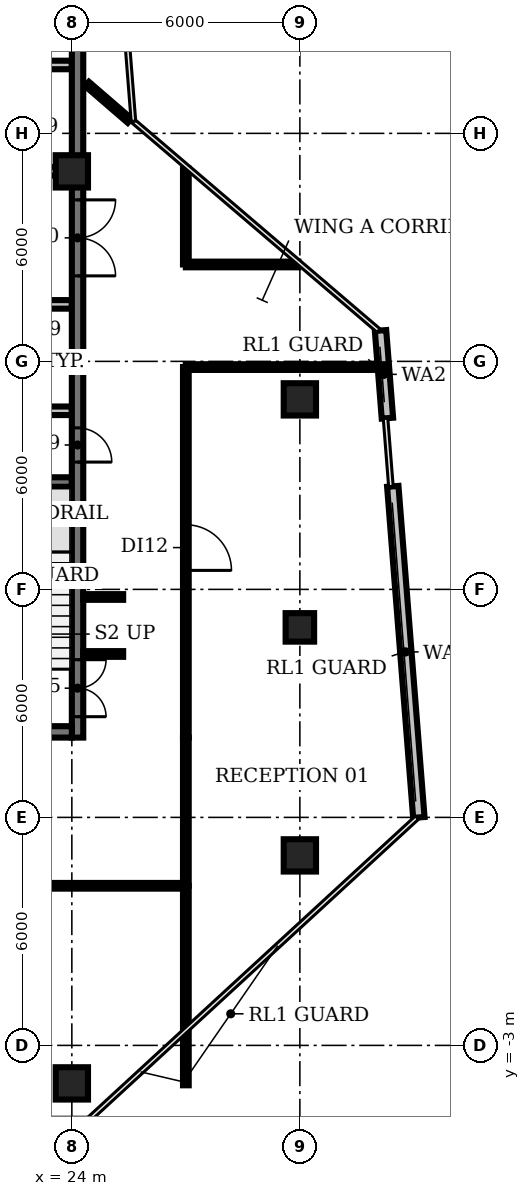
"""IFC4 building model, lengths in metres.
Left out: names, types, materials, properties, quantities, classifications, styles, units other than length and angle.
Written with IfcOpenShell. Run it as: python <this file> out.ifc"""

import sys

from ifc_helpers import new_model, si_unit, direction, frame, frame_2d, origin, origin_2d, place, context, subcontext, project, spatial, rectangle, circle, extrude, element, fill, save


model = new_model("IFC4")
c1 = context("Model", 3, precision=1e-05, world=origin(), true_north=direction((0.0, 1.0)))
c2 = subcontext(c1, "Body", "Model", "MODEL_VIEW")
j1 = project(units=[si_unit("LENGTHUNIT", "METRE"), si_unit("PLANEANGLEUNIT", "RADIAN")], contexts=[c1])
p1 = place(None, origin())
s1 = spatial("IfcSite", under=j1, at=p1, CompositionType="ELEMENT")
p2 = place(p1, origin())
s2 = spatial("IfcBuilding", under=s1, at=p2, CompositionType="ELEMENT")
p3 = place(p2, frame((0.0, 0.0, 306.2)))
s3 = spatial("IfcBuildingStorey", under=s2, at=p3, CompositionType="ELEMENT", Elevation=306.2)
for number, where, z_axis, x_axis in (
    (1, (24.0, -4.0, 0.0), (0.0, 0.0, 1.0), (1.0, 0.0, 0.0)),
    (2, (24.0, 20.0, 0.0), (0.0, 0.0, 1.0), (1.0, 0.0, 0.0)),
    (3, (30.0, 2.0, 0.0), (0.0, 0.0, 1.0), (1.0, 0.0, 0.0)),
):
    element("IfcColumn", number, at=place(p3, frame(where, z_axis=z_axis, x_axis=x_axis)), inside=s3, PredefinedType="COLUMN", context=c2, shape_type="SweptSolid", body=[
        extrude(circle(Radius=0.425, at=origin_2d()), origin(), (0.0, 0.0, 1.0), 3.85),
    ])
p4 = place(p3, frame((30.0, 8.0, 0.0), z_axis=(0.0, 0.0, 1.0), x_axis=(1.0, 0.0, 0.0)))
e4 = element("IfcColumn", 4, at=p4, inside=s3, PredefinedType="COLUMN", context=c2, shape_type="SweptSolid", body=[
    extrude(rectangle(XDim=0.75, YDim=0.75, at=origin_2d()), origin(), (0.0, 0.0, 1.0), 3.85),
])
p5 = place(p3, frame((30.0, 14.0, 0.0), z_axis=(0.0, 0.0, 1.0), x_axis=(1.0, 0.0, 0.0)))
e5 = element("IfcColumn", 5, at=p5, inside=s3, PredefinedType="COLUMN", context=c2, shape_type="SweptSolid", body=[
    extrude(circle(Radius=0.425, at=origin_2d()), origin(), (0.0, 0.0, 1.0), 3.85),
])
p6 = place(p3, frame((33.131, 2.998, 0.0), z_axis=(0.0, 0.0, 1.0), x_axis=(-0.078467243586, 0.996916692449, 0.0)))
e6 = element("IfcWall", 6, at=p6, inside=s3, PredefinedType="SOLIDWALL", context=c2, shape_type="SweptSolid", body=[
    extrude(rectangle(XDim=8.74, YDim=0.3, at=frame_2d((4.37, 0.0))), origin(), (0.0, 0.0, 1.0), 3.85),
])
p7 = place(p3, frame((32.304, 13.506, 0.0), z_axis=(0.0, 0.0, 1.0), x_axis=(-0.078407178347, 0.996921418359, 0.0)))
e7 = element("IfcWall", 7, at=p7, inside=s3, PredefinedType="SOLIDWALL", context=c2, shape_type="SweptSolid", body=[
    extrude(rectangle(XDim=2.313, YDim=0.3, at=frame_2d((1.157, 0.0))), origin(), (0.0, 0.0, 1.0), 3.85),
])
p8 = place(p3, frame((20.85, 11.825, 0.0), z_axis=(0.0, 0.0, 1.0), x_axis=(1.0, 0.0, 0.0)))
e8 = element("IfcWall", 8, at=p8, inside=s3, PredefinedType="SHEAR", context=c2, shape_type="SweptSolid", body=[
    extrude(rectangle(XDim=3.15, YDim=0.25, at=frame_2d((1.575, 0.0))), origin(), (0.0, 0.0, 1.0), 3.85),
])
p9 = place(p3, frame((16.6, 13.7, 0.0), z_axis=(0.0, 0.0, 1.0), x_axis=(1.0, 0.0, 0.0)))
e9 = element("IfcWall", 9, at=p9, inside=s3, PredefinedType="PARTITIONING", context=c2, shape_type="SweptSolid", body=[
    extrude(rectangle(XDim=7.4, YDim=0.225, at=frame_2d((3.7, 0.0))), origin(), (0.0, 0.0, 1.0), 3.85),
])
p10 = place(p3, frame((9.4, 16.5, 0.0), z_axis=(0.0, 0.0, 1.0), x_axis=(1.0, 0.0, 0.0)))
e10 = element("IfcWall", 10, at=p10, inside=s3, PredefinedType="PARTITIONING", context=c2, shape_type="SweptSolid", body=[
    extrude(rectangle(XDim=14.6, YDim=0.225, at=frame_2d((7.3, 0.0))), origin(), (0.0, 0.0, 1.0), 3.85),
])
p11 = place(p10, frame((0.85, 0.0, 0.0)))
e11 = element("IfcOpeningElement", 11, at=p11, cuts=e10, PredefinedType="OPENING", context=c2, shape_type="SweptSolid", body=[
    extrude(rectangle(XDim=0.9, YDim=2.1, at=frame_2d((0.45, 1.05))), frame((0.0, 0.123, 0.0), z_axis=(0.0, -1.0, 0.0), x_axis=(1.0, 0.0, 0.0)), (0.0, 0.0, 1.0), 0.245),
])
p12 = place(p10, frame((3.625, 0.0, 0.0)))
e12 = element("IfcOpeningElement", 12, at=p12, cuts=e10, PredefinedType="OPENING", context=c2, shape_type="SweptSolid", body=[
    extrude(rectangle(XDim=0.9, YDim=2.1, at=frame_2d((0.45, 1.05))), frame((0.0, 0.123, 0.0), z_axis=(0.0, -1.0, 0.0), x_axis=(1.0, 0.0, 0.0)), (0.0, 0.0, 1.0), 0.245),
])
p13 = place(p10, frame((7.775, 0.0, 0.0)))
e13 = element("IfcOpeningElement", 13, at=p13, cuts=e10, PredefinedType="OPENING", context=c2, shape_type="SweptSolid", body=[
    extrude(rectangle(XDim=1.0, YDim=2.1, at=frame_2d((0.5, 1.05))), frame((0.0, 0.123, 0.0), z_axis=(0.0, -1.0, 0.0), x_axis=(1.0, 0.0, 0.0)), (0.0, 0.0, 1.0), 0.245),
])
p14 = place(p10, frame((11.308, 0.0, 0.0)))
e14 = element("IfcOpeningElement", 14, at=p14, cuts=e10, PredefinedType="OPENING", context=c2, shape_type="SweptSolid", body=[
    extrude(rectangle(XDim=0.9, YDim=2.1, at=frame_2d((0.45, 1.05))), frame((0.0, 0.123, 0.0), z_axis=(0.0, -1.0, 0.0), x_axis=(1.0, 0.0, 0.0)), (0.0, 0.0, 1.0), 0.245),
])
p15 = place(p10, frame((13.083, 0.0, 0.0)))
e15 = element("IfcOpeningElement", 15, at=p15, cuts=e10, PredefinedType="OPENING", context=c2, shape_type="SweptSolid", body=[
    extrude(rectangle(XDim=0.9, YDim=2.1, at=frame_2d((0.45, 1.05))), frame((0.0, 0.123, 0.0), z_axis=(0.0, -1.0, 0.0), x_axis=(1.0, 0.0, 0.0)), (0.0, 0.0, 1.0), 0.245),
])
p16 = place(p3, frame((24.0, 20.0, 0.0), z_axis=(0.0, 0.0, 1.0), x_axis=(-1.0, 0.0, 0.0)))
e16 = element("IfcWall", 16, at=p16, inside=s3, PredefinedType="PARTITIONING", context=c2, shape_type="SweptSolid", body=[
    extrude(rectangle(XDim=14.6, YDim=0.225, at=frame_2d((7.3, 0.0))), origin(), (0.0, 0.0, 1.0), 3.85),
])
p17 = place(p16, frame((12.75, 0.0, 0.0)))
e17 = element("IfcOpeningElement", 17, at=p17, cuts=e16, PredefinedType="OPENING", context=c2, shape_type="SweptSolid", body=[
    extrude(rectangle(XDim=1.1, YDim=2.1, at=frame_2d((0.55, 1.05))), frame((0.0, 0.123, 0.0), z_axis=(0.0, -1.0, 0.0), x_axis=(1.0, 0.0, 0.0)), (0.0, 0.0, 1.0), 0.245),
])
p18 = place(p16, frame((9.95, 0.0, 0.0)))
e18 = element("IfcOpeningElement", 18, at=p18, cuts=e16, PredefinedType="OPENING", context=c2, shape_type="SweptSolid", body=[
    extrude(rectangle(XDim=1.1, YDim=2.1, at=frame_2d((0.55, 1.05))), frame((0.0, 0.123, 0.0), z_axis=(0.0, -1.0, 0.0), x_axis=(1.0, 0.0, 0.0)), (0.0, 0.0, 1.0), 0.245),
])
p19 = place(p16, frame((7.15, 0.0, 0.0)))
e19 = element("IfcOpeningElement", 19, at=p19, cuts=e16, PredefinedType="OPENING", context=c2, shape_type="SweptSolid", body=[
    extrude(rectangle(XDim=1.1, YDim=2.1, at=frame_2d((0.55, 1.05))), frame((0.0, 0.123, 0.0), z_axis=(0.0, -1.0, 0.0), x_axis=(1.0, 0.0, 0.0)), (0.0, 0.0, 1.0), 0.245),
])
p20 = place(p16, frame((4.35, 0.0, 0.0)))
e20 = element("IfcOpeningElement", 20, at=p20, cuts=e16, PredefinedType="OPENING", context=c2, shape_type="SweptSolid", body=[
    extrude(rectangle(XDim=1.1, YDim=2.1, at=frame_2d((0.55, 1.05))), frame((0.0, 0.123, 0.0), z_axis=(0.0, -1.0, 0.0), x_axis=(1.0, 0.0, 0.0)), (0.0, 0.0, 1.0), 0.245),
])
p21 = place(p16, frame((2.308, 0.0, 0.0)))
e21 = element("IfcOpeningElement", 21, at=p21, cuts=e16, PredefinedType="OPENING", context=c2, shape_type="SweptSolid", body=[
    extrude(rectangle(XDim=0.9, YDim=2.1, at=frame_2d((0.45, 1.05))), frame((0.0, 0.123, 0.0), z_axis=(0.0, -1.0, 0.0), x_axis=(1.0, 0.0, 0.0)), (0.0, 0.0, 1.0), 0.245),
])
p22 = place(p16, frame((0.633, 0.0, 0.0)))
e22 = element("IfcOpeningElement", 22, at=p22, cuts=e16, PredefinedType="OPENING", context=c2, shape_type="SweptSolid", body=[
    extrude(rectangle(XDim=0.9, YDim=2.1, at=frame_2d((0.45, 1.05))), frame((0.0, 0.123, 0.0), z_axis=(0.0, -1.0, 0.0), x_axis=(1.0, 0.0, 0.0)), (0.0, 0.0, 1.0), 0.245),
])
p23 = place(p3, frame((9.4, 22.8, 0.0), z_axis=(0.0, 0.0, 1.0), x_axis=(1.0, 0.0, 0.0)))
e23 = element("IfcWall", 23, at=p23, inside=s3, PredefinedType="PARTITIONING", context=c2, shape_type="SweptSolid", body=[
    extrude(rectangle(XDim=14.6, YDim=0.225, at=frame_2d((7.3, 0.0))), origin(), (0.0, 0.0, 1.0), 3.85),
])
p24 = place(p3, frame((24.15, 25.655, 0.0), z_axis=(0.0, 0.0, 1.0), x_axis=(0.0, -1.0, 0.0)))
e24 = element("IfcWall", 24, at=p24, inside=s3, PredefinedType="SHEAR", context=c2, shape_type="SweptSolid", body=[
    extrude(rectangle(XDim=20.555, YDim=0.3, at=frame_2d((10.277, 0.0))), origin(), (0.0, 0.0, 1.0), 3.85),
])
p25 = place(p24, frame((18.505, 0.0, 0.0)))
e25 = element("IfcOpeningElement", 25, at=p25, cuts=e24, PredefinedType="OPENING", context=c2, shape_type="SweptSolid", body=[
    extrude(rectangle(XDim=1.5, YDim=2.1, at=frame_2d((0.75, 1.05))), frame((0.0, 0.16, 0.0), z_axis=(0.0, -1.0, 0.0), x_axis=(1.0, 0.0, 0.0)), (0.0, 0.0, 1.0), 0.32),
])
p26 = place(p24, frame((12.405, 0.0, 0.0)))
e26 = element("IfcOpeningElement", 26, at=p26, cuts=e24, PredefinedType="OPENING", context=c2, shape_type="SweptSolid", body=[
    extrude(rectangle(XDim=0.9, YDim=2.1, at=frame_2d((0.45, 1.05))), frame((0.0, 0.16, 0.0), z_axis=(0.0, -1.0, 0.0), x_axis=(1.0, 0.0, 0.0)), (0.0, 0.0, 1.0), 0.32),
])
p27 = place(p24, frame((6.405, 0.0, 0.0)))
e27 = element("IfcOpeningElement", 27, at=p27, cuts=e24, PredefinedType="OPENING", context=c2, shape_type="SweptSolid", body=[
    extrude(rectangle(XDim=2.0, YDim=2.1, at=frame_2d((1.0, 1.05))), frame((0.0, 0.16, 0.0), z_axis=(0.0, -1.0, 0.0), x_axis=(1.0, 0.0, 0.0)), (0.0, 0.0, 1.0), 0.32),
])
p28 = place(p3, frame((24.0, 5.25, 0.0), z_axis=(0.0, 0.0, 1.0), x_axis=(-1.0, 0.0, 0.0)))
e28 = element("IfcWall", 28, at=p28, inside=s3, PredefinedType="SHEAR", context=c2, shape_type="SweptSolid", body=[
    extrude(rectangle(XDim=18.0, YDim=0.3, at=frame_2d((9.0, 0.0))), origin(), (0.0, 0.0, 1.0), 3.85),
])
p29 = place(p28, frame((13.0, 0.0, 0.0)))
e29 = element("IfcOpeningElement", 29, at=p29, cuts=e28, PredefinedType="OPENING", context=c2, shape_type="SweptSolid", body=[
    extrude(rectangle(XDim=1.2, YDim=2.1, at=frame_2d((0.6, 1.05))), frame((0.0, 0.16, 0.0), z_axis=(0.0, -1.0, 0.0), x_axis=(1.0, 0.0, 0.0)), (0.0, 0.0, 1.0), 0.32),
])
p30 = place(p28, frame((4.9, 0.0, 0.0)))
e30 = element("IfcOpeningElement", 30, at=p30, cuts=e28, PredefinedType="OPENING", context=c2, shape_type="SweptSolid", body=[
    extrude(rectangle(XDim=1.0, YDim=2.1, at=frame_2d((0.5, 1.05))), frame((0.0, 0.16, 0.0), z_axis=(0.0, -1.0, 0.0), x_axis=(1.0, 0.0, 0.0)), (0.0, 0.0, 1.0), 0.32),
])
for number, where, z_axis, x_axis in (
    (31, (24.3, 7.3, 0.0), (0.0, 0.0, 1.0), (1.0, 0.0, 0.0)),
    (32, (24.3, 8.8, 0.0), (0.0, 0.0, 1.0), (1.0, 0.0, 0.0)),
):
    element("IfcWall", number, at=place(p3, frame(where, z_axis=z_axis, x_axis=x_axis)), inside=s3, PredefinedType="PARTITIONING", context=c2, shape_type="SweptSolid", body=[
        extrude(rectangle(XDim=1.05, YDim=0.15, at=frame_2d((0.525, 0.0))), origin(), (0.0, 0.0, 1.0), 2.9),
    ])
p31 = place(p3, frame((24.4, 22.3, 0.0), z_axis=(0.0, 0.0, 1.0), x_axis=(0.756967766194, -0.653452217796, 0.0)))
e33 = element("IfcWall", 33, at=p31, inside=s3, PredefinedType="PARTITIONING", context=c2, shape_type="SweptSolid", body=[
    extrude(rectangle(XDim=1.479, YDim=0.15, at=frame_2d((0.739, 0.0))), origin(), (0.0, 0.0, 1.0), 2.9),
])
p32 = place(p3, frame((27.0, -4.05, 0.0), z_axis=(0.0, 0.0, 1.0), x_axis=(0.0, 1.0, 0.0)))
e34 = element("IfcWall", 34, at=p32, inside=s3, PredefinedType="PARTITIONING", context=c2, shape_type="SweptSolid", body=[
    extrude(rectangle(XDim=5.25, YDim=0.15, at=frame_2d((2.625, 0.0))), origin(), (0.0, 0.0, 1.0), 2.9),
])
p33 = place(p3, frame((27.0, 1.2, 0.0), z_axis=(0.0, 0.0, 1.0), x_axis=(-1.0, 0.0, 0.0)))
e35 = element("IfcWall", 35, at=p33, inside=s3, PredefinedType="PARTITIONING", context=c2, shape_type="SweptSolid", body=[
    extrude(rectangle(XDim=24.0, YDim=0.15, at=frame_2d((12.0, 0.0))), origin(), (0.0, 0.0, 1.0), 2.9),
])
p34 = place(p33, frame((11.5, 0.0, 0.0)))
e36 = element("IfcOpeningElement", 36, at=p34, cuts=e35, PredefinedType="OPENING", context=c2, shape_type="SweptSolid", body=[
    extrude(rectangle(XDim=1.2, YDim=2.1, at=frame_2d((0.6, 1.05))), frame((0.0, 0.085, 0.0), z_axis=(0.0, -1.0, 0.0), x_axis=(1.0, 0.0, 0.0)), (0.0, 0.0, 1.0), 0.17),
])
p35 = place(p3, frame((27.0, 1.2, 0.0), z_axis=(0.0, 0.0, 1.0), x_axis=(0.0, 1.0, 0.0)))
e37 = element("IfcWall", 37, at=p35, inside=s3, PredefinedType="PARTITIONING", context=c2, shape_type="SweptSolid", body=[
    extrude(rectangle(XDim=3.9, YDim=0.15, at=frame_2d((1.95, 0.0))), origin(), (0.0, 0.0, 1.0), 2.9),
])
p36 = place(p3, frame((27.0, 14.85, 0.0), z_axis=(0.0, 0.0, 1.0), x_axis=(0.0, -1.0, 0.0)))
e38 = element("IfcWall", 38, at=p36, inside=s3, PredefinedType="PARTITIONING", context=c2, shape_type="SweptSolid", body=[
    extrude(rectangle(XDim=9.75, YDim=0.15, at=frame_2d((4.875, 0.0))), origin(), (0.0, 0.0, 1.0), 2.9),
])
p37 = place(p36, frame((4.15, 0.0, 0.0)))
e39 = element("IfcOpeningElement", 39, at=p37, cuts=e38, PredefinedType="OPENING", context=c2, shape_type="SweptSolid", body=[
    extrude(rectangle(XDim=1.2, YDim=2.1, at=frame_2d((0.6, 1.05))), frame((0.0, 0.085, 0.0), z_axis=(0.0, -1.0, 0.0), x_axis=(1.0, 0.0, 0.0)), (0.0, 0.0, 1.0), 0.17),
])
p38 = place(p3, frame((27.0, 14.85, 0.0), z_axis=(0.0, 0.0, 1.0), x_axis=(1.0, 0.0, 0.0)))
e40 = element("IfcWall", 40, at=p38, inside=s3, PredefinedType="PARTITIONING", context=c2, shape_type="SweptSolid", body=[
    extrude(rectangle(XDim=5.208, YDim=0.15, at=frame_2d((2.604, 0.0))), origin(), (0.0, 0.0, 1.0), 2.9),
])
p39 = place(p3, frame((27.0, 17.55, 0.0), z_axis=(0.0, 0.0, 1.0), x_axis=(0.0, 1.0, 0.0)))
e41 = element("IfcWall", 41, at=p39, inside=s3, PredefinedType="PARTITIONING", context=c2, shape_type="SweptSolid", body=[
    extrude(rectangle(XDim=2.52, YDim=0.15, at=frame_2d((1.26, 0.0))), origin(), (0.0, 0.0, 1.0), 2.9),
])
p40 = place(p3, frame((27.0, 17.55, 0.0), z_axis=(0.0, 0.0, 1.0), x_axis=(1.0, 0.0, 0.0)))
e42 = element("IfcWall", 42, at=p40, inside=s3, PredefinedType="PARTITIONING", context=c2, shape_type="SweptSolid", body=[
    extrude(rectangle(XDim=2.96, YDim=0.15, at=frame_2d((1.48, 0.0))), origin(), (0.0, 0.0, 1.0), 2.9),
])
p41 = place(p25, origin())
e43 = element("IfcDoor", 43, at=p41, inside=s3, OperationType="DOUBLE_DOOR_SINGLE_SWING", PredefinedType="DOOR", context=c2, shape_type="SweptSolid", body=[
    extrude(rectangle(XDim=1.5, YDim=2.1, at=frame_2d((0.75, 1.05))), frame((0.0, 0.025, 0.0), z_axis=(0.0, -1.0, 0.0), x_axis=(1.0, 0.0, 0.0)), (0.0, 0.0, 1.0), 0.05),
])
fill(e25, e43)
p42 = place(p26, origin())
e44 = element("IfcDoor", 44, at=p42, inside=s3, OperationType="SINGLE_SWING_RIGHT", PredefinedType="DOOR", context=c2, shape_type="SweptSolid", body=[
    extrude(rectangle(XDim=0.9, YDim=2.1, at=frame_2d((0.45, 1.05))), frame((0.0, 0.025, 0.0), z_axis=(0.0, -1.0, 0.0), x_axis=(1.0, 0.0, 0.0)), (0.0, 0.0, 1.0), 0.05),
])
fill(e26, e44)
p43 = place(p27, origin())
e45 = element("IfcDoor", 45, at=p43, inside=s3, OperationType="DOUBLE_DOOR_SINGLE_SWING", PredefinedType="DOOR", context=c2, shape_type="SweptSolid", body=[
    extrude(rectangle(XDim=2.0, YDim=2.1, at=frame_2d((1.0, 1.05))), frame((0.0, 0.025, 0.0), z_axis=(0.0, -1.0, 0.0), x_axis=(1.0, 0.0, 0.0)), (0.0, 0.0, 1.0), 0.05),
])
fill(e27, e45)
p44 = place(p37, origin())
e46 = element("IfcDoor", 46, at=p44, inside=s3, OperationType="SINGLE_SWING_RIGHT", PredefinedType="DOOR", context=c2, shape_type="SweptSolid", body=[
    extrude(rectangle(XDim=1.2, YDim=2.1, at=frame_2d((0.6, 1.05))), frame((0.0, 0.025, 0.0), z_axis=(0.0, -1.0, 0.0), x_axis=(1.0, 0.0, 0.0)), (0.0, 0.0, 1.0), 0.05),
])
fill(e39, e46)
save(model, sys.argv[1])
